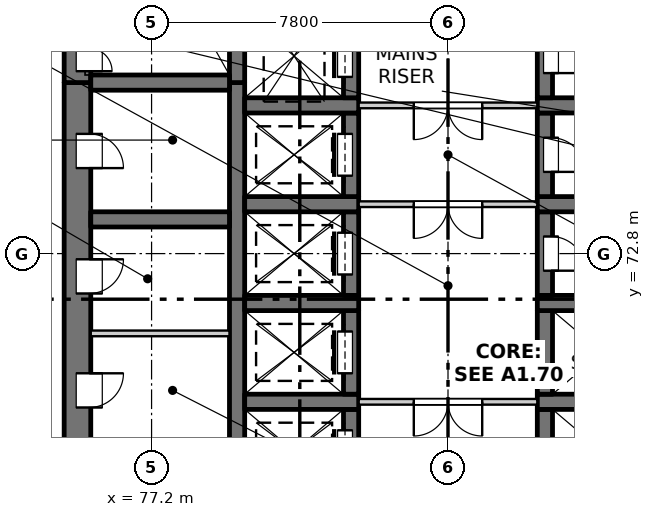
"""IFC4 building model, lengths in metres.
Left out: names, types, materials, properties, quantities, classifications, styles, units other than length and angle.
Written with IfcOpenShell. Run it as: python <this file> out.ifc"""

import sys

from ifc_helpers import new_model, si_unit, direction, frame, frame_2d, origin, place, context, subcontext, project, spatial, rectangle, extrude, element, fill, save


model = new_model("IFC4")
c1 = context("Model", 3, precision=1e-05, world=origin(), true_north=direction((0.0, 1.0)))
c2 = subcontext(c1, "Body", "Model", "MODEL_VIEW")
j1 = project(units=[si_unit("LENGTHUNIT", "METRE"), si_unit("PLANEANGLEUNIT", "RADIAN")], contexts=[c1])
p1 = place(None, origin())
s1 = spatial("IfcSite", under=j1, at=p1, CompositionType="ELEMENT")
p2 = place(p1, origin())
s2 = spatial("IfcBuilding", under=s1, at=p2, CompositionType="ELEMENT")
p3 = place(p2, frame((0.0, 0.0, 6.0)))
s3 = spatial("IfcBuildingStorey", under=s2, at=p3, CompositionType="ELEMENT", Elevation=6.0)
p4 = place(p3, frame((75.25, 54.9, -0.3), z_axis=(0.0, 0.0, 1.0), x_axis=(0.0, 1.0, 0.0)))
e1 = element("IfcWall", 1, at=p4, inside=s3, PredefinedType="SOLIDWALL", context=c2, shape_type="SweptSolid", body=[
    extrude(rectangle(XDim=22.4, YDim=0.7, at=frame_2d((11.2, 0.0))), origin(), (0.0, 0.0, 1.0), 4.5),
])
p5 = place(p4, frame((7.55, 0.0, 0.3)))
e2 = element("IfcOpeningElement", 2, at=p5, cuts=e1, PredefinedType="OPENING", context=c2, shape_type="SweptSolid", body=[
    extrude(rectangle(XDim=0.9, YDim=2.1, at=frame_2d((0.45, 1.05))), frame((0.0, 0.36, 0.0), z_axis=(0.0, -1.0, 0.0), x_axis=(1.0, 0.0, 0.0)), (0.0, 0.0, 1.0), 0.72),
])
p6 = place(p4, frame((10.85, 0.0, 0.3)))
e3 = element("IfcOpeningElement", 3, at=p6, cuts=e1, PredefinedType="OPENING", context=c2, shape_type="SweptSolid", body=[
    extrude(rectangle(XDim=0.9, YDim=2.1, at=frame_2d((0.45, 1.05))), frame((0.0, 0.36, 0.0), z_axis=(0.0, -1.0, 0.0), x_axis=(1.0, 0.0, 0.0)), (0.0, 0.0, 1.0), 0.72),
])
p7 = place(p4, frame((13.85, 0.0, 0.3)))
e4 = element("IfcOpeningElement", 4, at=p7, cuts=e1, PredefinedType="OPENING", context=c2, shape_type="SweptSolid", body=[
    extrude(rectangle(XDim=0.9, YDim=2.1, at=frame_2d((0.45, 1.05))), frame((0.0, 0.36, 0.0), z_axis=(0.0, -1.0, 0.0), x_axis=(1.0, 0.0, 0.0)), (0.0, 0.0, 1.0), 0.72),
])
p8 = place(p4, frame((16.85, 0.0, 0.3)))
e5 = element("IfcOpeningElement", 5, at=p8, cuts=e1, PredefinedType="OPENING", context=c2, shape_type="SweptSolid", body=[
    extrude(rectangle(XDim=0.9, YDim=2.1, at=frame_2d((0.45, 1.05))), frame((0.0, 0.36, 0.0), z_axis=(0.0, -1.0, 0.0), x_axis=(1.0, 0.0, 0.0)), (0.0, 0.0, 1.0), 0.72),
])
p9 = place(p4, frame((20.15, 0.0, 0.3)))
e6 = element("IfcOpeningElement", 6, at=p9, cuts=e1, PredefinedType="OPENING", context=c2, shape_type="SweptSolid", body=[
    extrude(rectangle(XDim=0.9, YDim=2.1, at=frame_2d((0.45, 1.05))), frame((0.0, 0.36, 0.0), z_axis=(0.0, -1.0, 0.0), x_axis=(1.0, 0.0, 0.0)), (0.0, 0.0, 1.0), 0.72),
])
p10 = place(p3, frame((75.25, 77.3, -0.3), z_axis=(0.0, 0.0, 1.0), x_axis=(0.0, 1.0, 0.0)))
e7 = element("IfcWall", 7, at=p10, inside=s3, PredefinedType="SOLIDWALL", context=c2, shape_type="SweptSolid", body=[
    extrude(rectangle(XDim=7.55, YDim=0.7, at=frame_2d((3.775, 0.0))), origin(), (0.0, 0.0, 1.0), 4.5),
])
p11 = place(p10, frame((0.3, 0.0, 0.3)))
e8 = element("IfcOpeningElement", 8, at=p11, cuts=e7, PredefinedType="OPENING", context=c2, shape_type="SweptSolid", body=[
    extrude(rectangle(XDim=1.2, YDim=2.1, at=frame_2d((0.6, 1.05))), frame((0.0, 0.36, 0.0), z_axis=(0.0, -1.0, 0.0), x_axis=(1.0, 0.0, 0.0)), (0.0, 0.0, 1.0), 0.72),
])
p12 = place(p3, frame((79.45, 60.9, -0.3), z_axis=(0.0, 0.0, 1.0), x_axis=(0.0, 1.0, 0.0)))
e9 = element("IfcWall", 9, at=p12, inside=s3, PredefinedType="SOLIDWALL", context=c2, shape_type="SweptSolid", body=[
    extrude(rectangle(XDim=16.4, YDim=0.4, at=frame_2d((8.2, 0.0))), origin(), (0.0, 0.0, 1.0), 4.5),
])
p13 = place(p3, frame((79.45, 77.3, -0.3), z_axis=(0.0, 0.0, 1.0), x_axis=(0.0, 1.0, 0.0)))
e10 = element("IfcWall", 10, at=p13, inside=s3, PredefinedType="SOLIDWALL", context=c2, shape_type="SweptSolid", body=[
    extrude(rectangle(XDim=6.85, YDim=0.4, at=frame_2d((3.425, 0.0))), origin(), (0.0, 0.0, 1.0), 4.5),
])
p14 = place(p3, frame((82.45, 66.5, -0.3), z_axis=(0.0, 0.0, 1.0), x_axis=(0.0, 1.0, 0.0)))
e11 = element("IfcWall", 11, at=p14, inside=s3, PredefinedType="SOLIDWALL", context=c2, shape_type="SweptSolid", body=[
    extrude(rectangle(XDim=2.2, YDim=0.4, at=frame_2d((1.1, 0.0))), origin(), (0.0, 0.0, 1.0), 4.5),
])
p15 = place(p14, frame((0.55, 0.0, 0.3)))
e12 = element("IfcOpeningElement", 12, at=p15, cuts=e11, PredefinedType="OPENING", context=c2, shape_type="SweptSolid", body=[
    extrude(rectangle(XDim=1.1, YDim=2.1, at=frame_2d((0.55, 1.05))), frame((0.0, 0.21, 0.0), z_axis=(0.0, -1.0, 0.0), x_axis=(1.0, 0.0, 0.0)), (0.0, 0.0, 1.0), 0.42),
])
p16 = place(p3, frame((79.65, 68.9, -0.3), z_axis=(0.0, 0.0, 1.0), x_axis=(1.0, 0.0, 0.0)))
e13 = element("IfcWall", 13, at=p16, inside=s3, PredefinedType="SOLIDWALL", context=c2, shape_type="SweptSolid", body=[
    extrude(rectangle(XDim=3.0, YDim=0.4, at=frame_2d((1.5, 0.0))), origin(), (0.0, 0.0, 1.0), 4.5),
])
p17 = place(p3, frame((82.45, 69.1, -0.3), z_axis=(0.0, 0.0, 1.0), x_axis=(0.0, 1.0, 0.0)))
e14 = element("IfcWall", 14, at=p17, inside=s3, PredefinedType="SOLIDWALL", context=c2, shape_type="SweptSolid", body=[
    extrude(rectangle(XDim=2.2, YDim=0.4, at=frame_2d((1.1, 0.0))), origin(), (0.0, 0.0, 1.0), 4.5),
])
p18 = place(p17, frame((0.55, 0.0, 0.3)))
e15 = element("IfcOpeningElement", 15, at=p18, cuts=e14, PredefinedType="OPENING", context=c2, shape_type="SweptSolid", body=[
    extrude(rectangle(XDim=1.1, YDim=2.1, at=frame_2d((0.55, 1.05))), frame((0.0, 0.21, 0.0), z_axis=(0.0, -1.0, 0.0), x_axis=(1.0, 0.0, 0.0)), (0.0, 0.0, 1.0), 0.42),
])
p19 = place(p3, frame((79.65, 71.5, -0.3), z_axis=(0.0, 0.0, 1.0), x_axis=(1.0, 0.0, 0.0)))
e16 = element("IfcWall", 16, at=p19, inside=s3, PredefinedType="SOLIDWALL", context=c2, shape_type="SweptSolid", body=[
    extrude(rectangle(XDim=3.0, YDim=0.4, at=frame_2d((1.5, 0.0))), origin(), (0.0, 0.0, 1.0), 4.5),
])
p20 = place(p3, frame((82.45, 71.7, -0.3), z_axis=(0.0, 0.0, 1.0), x_axis=(0.0, 1.0, 0.0)))
e17 = element("IfcWall", 17, at=p20, inside=s3, PredefinedType="SOLIDWALL", context=c2, shape_type="SweptSolid", body=[
    extrude(rectangle(XDim=2.2, YDim=0.4, at=frame_2d((1.1, 0.0))), origin(), (0.0, 0.0, 1.0), 4.5),
])
p21 = place(p20, frame((0.55, 0.0, 0.3)))
e18 = element("IfcOpeningElement", 18, at=p21, cuts=e17, PredefinedType="OPENING", context=c2, shape_type="SweptSolid", body=[
    extrude(rectangle(XDim=1.1, YDim=2.1, at=frame_2d((0.55, 1.05))), frame((0.0, 0.21, 0.0), z_axis=(0.0, -1.0, 0.0), x_axis=(1.0, 0.0, 0.0)), (0.0, 0.0, 1.0), 0.42),
])
p22 = place(p3, frame((79.65, 74.1, -0.3), z_axis=(0.0, 0.0, 1.0), x_axis=(1.0, 0.0, 0.0)))
e19 = element("IfcWall", 19, at=p22, inside=s3, PredefinedType="SOLIDWALL", context=c2, shape_type="SweptSolid", body=[
    extrude(rectangle(XDim=3.0, YDim=0.4, at=frame_2d((1.5, 0.0))), origin(), (0.0, 0.0, 1.0), 4.5),
])
p23 = place(p3, frame((82.45, 74.3, -0.3), z_axis=(0.0, 0.0, 1.0), x_axis=(0.0, 1.0, 0.0)))
e20 = element("IfcWall", 20, at=p23, inside=s3, PredefinedType="SOLIDWALL", context=c2, shape_type="SweptSolid", body=[
    extrude(rectangle(XDim=2.2, YDim=0.4, at=frame_2d((1.1, 0.0))), origin(), (0.0, 0.0, 1.0), 4.5),
])
p24 = place(p23, frame((0.55, 0.0, 0.3)))
e21 = element("IfcOpeningElement", 21, at=p24, cuts=e20, PredefinedType="OPENING", context=c2, shape_type="SweptSolid", body=[
    extrude(rectangle(XDim=1.1, YDim=2.1, at=frame_2d((0.55, 1.05))), frame((0.0, 0.21, 0.0), z_axis=(0.0, -1.0, 0.0), x_axis=(1.0, 0.0, 0.0)), (0.0, 0.0, 1.0), 0.42),
])
p25 = place(p3, frame((79.65, 76.7, -0.3), z_axis=(0.0, 0.0, 1.0), x_axis=(1.0, 0.0, 0.0)))
e22 = element("IfcWall", 22, at=p25, inside=s3, PredefinedType="SOLIDWALL", context=c2, shape_type="SweptSolid", body=[
    extrude(rectangle(XDim=3.0, YDim=0.4, at=frame_2d((1.5, 0.0))), origin(), (0.0, 0.0, 1.0), 4.5),
])
p26 = place(p3, frame((82.45, 76.9, -0.3), z_axis=(0.0, 0.0, 1.0), x_axis=(0.0, 1.0, 0.0)))
e23 = element("IfcWall", 23, at=p26, inside=s3, PredefinedType="SOLIDWALL", context=c2, shape_type="SweptSolid", body=[
    extrude(rectangle(XDim=2.2, YDim=0.4, at=frame_2d((1.1, 0.0))), origin(), (0.0, 0.0, 1.0), 4.5),
])
p27 = place(p26, frame((0.55, 0.0, 0.3)))
e24 = element("IfcOpeningElement", 24, at=p27, cuts=e23, PredefinedType="OPENING", context=c2, shape_type="SweptSolid", body=[
    extrude(rectangle(XDim=1.1, YDim=2.1, at=frame_2d((0.55, 1.05))), frame((0.0, 0.21, 0.0), z_axis=(0.0, -1.0, 0.0), x_axis=(1.0, 0.0, 0.0)), (0.0, 0.0, 1.0), 0.42),
])
p28 = place(p3, frame((87.55, 66.5, -0.3), z_axis=(0.0, 0.0, 1.0), x_axis=(0.0, 1.0, 0.0)))
e25 = element("IfcWall", 25, at=p28, inside=s3, PredefinedType="SOLIDWALL", context=c2, shape_type="SweptSolid", body=[
    extrude(rectangle(XDim=2.2, YDim=0.4, at=frame_2d((1.1, 0.0))), origin(), (0.0, 0.0, 1.0), 4.5),
])
p29 = place(p3, frame((87.35, 68.9, -0.3), z_axis=(0.0, 0.0, 1.0), x_axis=(1.0, 0.0, 0.0)))
e26 = element("IfcWall", 26, at=p29, inside=s3, PredefinedType="SOLIDWALL", context=c2, shape_type="SweptSolid", body=[
    extrude(rectangle(XDim=3.0, YDim=0.4, at=frame_2d((1.5, 0.0))), origin(), (0.0, 0.0, 1.0), 4.5),
])
p30 = place(p3, frame((87.55, 69.1, -0.3), z_axis=(0.0, 0.0, 1.0), x_axis=(0.0, 1.0, 0.0)))
e27 = element("IfcWall", 27, at=p30, inside=s3, PredefinedType="SOLIDWALL", context=c2, shape_type="SweptSolid", body=[
    extrude(rectangle(XDim=2.2, YDim=0.4, at=frame_2d((1.1, 0.0))), origin(), (0.0, 0.0, 1.0), 4.5),
])
p31 = place(p3, frame((87.35, 71.5, -0.3), z_axis=(0.0, 0.0, 1.0), x_axis=(1.0, 0.0, 0.0)))
e28 = element("IfcWall", 28, at=p31, inside=s3, PredefinedType="SOLIDWALL", context=c2, shape_type="SweptSolid", body=[
    extrude(rectangle(XDim=3.0, YDim=0.4, at=frame_2d((1.5, 0.0))), origin(), (0.0, 0.0, 1.0), 4.5),
])
p32 = place(p3, frame((87.55, 71.7, -0.3), z_axis=(0.0, 0.0, 1.0), x_axis=(0.0, 1.0, 0.0)))
e29 = element("IfcWall", 29, at=p32, inside=s3, PredefinedType="SOLIDWALL", context=c2, shape_type="SweptSolid", body=[
    extrude(rectangle(XDim=2.2, YDim=0.4, at=frame_2d((1.1, 0.0))), origin(), (0.0, 0.0, 1.0), 4.5),
])
p33 = place(p32, frame((0.65, 0.0, 0.3)))
e30 = element("IfcOpeningElement", 30, at=p33, cuts=e29, PredefinedType="OPENING", context=c2, shape_type="SweptSolid", body=[
    extrude(rectangle(XDim=0.9, YDim=2.1, at=frame_2d((0.45, 1.05))), frame((0.0, 0.21, 0.0), z_axis=(0.0, -1.0, 0.0), x_axis=(1.0, 0.0, 0.0)), (0.0, 0.0, 1.0), 0.42),
])
p34 = place(p3, frame((87.35, 74.1, -0.3), z_axis=(0.0, 0.0, 1.0), x_axis=(1.0, 0.0, 0.0)))
e31 = element("IfcWall", 31, at=p34, inside=s3, PredefinedType="SOLIDWALL", context=c2, shape_type="SweptSolid", body=[
    extrude(rectangle(XDim=3.0, YDim=0.4, at=frame_2d((1.5, 0.0))), origin(), (0.0, 0.0, 1.0), 4.5),
])
p35 = place(p3, frame((87.55, 74.3, -0.3), z_axis=(0.0, 0.0, 1.0), x_axis=(0.0, 1.0, 0.0)))
e32 = element("IfcWall", 32, at=p35, inside=s3, PredefinedType="SOLIDWALL", context=c2, shape_type="SweptSolid", body=[
    extrude(rectangle(XDim=2.2, YDim=0.4, at=frame_2d((1.1, 0.0))), origin(), (0.0, 0.0, 1.0), 4.5),
])
p36 = place(p35, frame((0.65, 0.0, 0.3)))
e33 = element("IfcOpeningElement", 33, at=p36, cuts=e32, PredefinedType="OPENING", context=c2, shape_type="SweptSolid", body=[
    extrude(rectangle(XDim=0.9, YDim=2.1, at=frame_2d((0.45, 1.05))), frame((0.0, 0.21, 0.0), z_axis=(0.0, -1.0, 0.0), x_axis=(1.0, 0.0, 0.0)), (0.0, 0.0, 1.0), 0.42),
])
p37 = place(p3, frame((87.35, 76.7, -0.3), z_axis=(0.0, 0.0, 1.0), x_axis=(1.0, 0.0, 0.0)))
e34 = element("IfcWall", 34, at=p37, inside=s3, PredefinedType="SOLIDWALL", context=c2, shape_type="SweptSolid", body=[
    extrude(rectangle(XDim=3.0, YDim=0.4, at=frame_2d((1.5, 0.0))), origin(), (0.0, 0.0, 1.0), 4.5),
])
p38 = place(p3, frame((87.55, 76.9, -0.3), z_axis=(0.0, 0.0, 1.0), x_axis=(0.0, 1.0, 0.0)))
e35 = element("IfcWall", 35, at=p38, inside=s3, PredefinedType="SOLIDWALL", context=c2, shape_type="SweptSolid", body=[
    extrude(rectangle(XDim=2.2, YDim=0.4, at=frame_2d((1.1, 0.0))), origin(), (0.0, 0.0, 1.0), 4.5),
])
p39 = place(p38, frame((0.65, 0.0, 0.3)))
e36 = element("IfcOpeningElement", 36, at=p39, cuts=e35, PredefinedType="OPENING", context=c2, shape_type="SweptSolid", body=[
    extrude(rectangle(XDim=0.9, YDim=2.1, at=frame_2d((0.45, 1.05))), frame((0.0, 0.21, 0.0), z_axis=(0.0, -1.0, 0.0), x_axis=(1.0, 0.0, 0.0)), (0.0, 0.0, 1.0), 0.42),
])
for number, where, z_axis, x_axis in (
    (37, (75.6, 73.7, -0.3), (0.0, 0.0, 1.0), (1.0, 0.0, 0.0)),
    (38, (75.6, 77.3, -0.3), (0.0, 0.0, 1.0), (1.0, 0.0, 0.0)),
):
    element("IfcWall", number, at=place(p3, frame(where, z_axis=z_axis, x_axis=x_axis)), inside=s3, PredefinedType="SOLIDWALL", context=c2, shape_type="SweptSolid", body=[
        extrude(rectangle(XDim=3.65, YDim=0.4, at=frame_2d((1.825, 0.0))), origin(), (0.0, 0.0, 1.0), 4.5),
    ])
p40 = place(p3, frame((82.65, 68.9, 0.0), z_axis=(0.0, 0.0, 1.0), x_axis=(1.0, 0.0, 0.0)))
e39 = element("IfcWall", 39, at=p40, inside=s3, PredefinedType="PARTITIONING", context=c2, shape_type="SweptSolid", body=[
    extrude(rectangle(XDim=4.7, YDim=0.15, at=frame_2d((2.35, 0.0))), origin(), (0.0, 0.0, 1.0), 4.2),
])
p41 = place(p40, frame((1.45, 0.0, 0.0)))
e40 = element("IfcOpeningElement", 40, at=p41, cuts=e39, PredefinedType="OPENING", context=c2, shape_type="SweptSolid", body=[
    extrude(rectangle(XDim=1.8, YDim=2.1, at=frame_2d((0.9, 1.05))), frame((0.0, 0.085, 0.0), z_axis=(0.0, -1.0, 0.0), x_axis=(1.0, 0.0, 0.0)), (0.0, 0.0, 1.0), 0.17),
])
p42 = place(p3, frame((75.6, 70.7, 0.0), z_axis=(0.0, 0.0, 1.0), x_axis=(1.0, 0.0, 0.0)))
e41 = element("IfcWall", 41, at=p42, inside=s3, PredefinedType="PARTITIONING", context=c2, shape_type="SweptSolid", body=[
    extrude(rectangle(XDim=3.65, YDim=0.15, at=frame_2d((1.825, 0.0))), origin(), (0.0, 0.0, 1.0), 4.2),
])
p43 = place(p3, frame((82.65, 74.1, 0.0), z_axis=(0.0, 0.0, 1.0), x_axis=(1.0, 0.0, 0.0)))
e42 = element("IfcWall", 42, at=p43, inside=s3, PredefinedType="PARTITIONING", context=c2, shape_type="SweptSolid", body=[
    extrude(rectangle(XDim=4.7, YDim=0.15, at=frame_2d((2.35, 0.0))), origin(), (0.0, 0.0, 1.0), 4.2),
])
p44 = place(p43, frame((1.45, 0.0, 0.0)))
e43 = element("IfcOpeningElement", 43, at=p44, cuts=e42, PredefinedType="OPENING", context=c2, shape_type="SweptSolid", body=[
    extrude(rectangle(XDim=1.8, YDim=2.1, at=frame_2d((0.9, 1.05))), frame((0.0, 0.085, 0.0), z_axis=(0.0, -1.0, 0.0), x_axis=(1.0, 0.0, 0.0)), (0.0, 0.0, 1.0), 0.17),
])
p45 = place(p3, frame((82.65, 76.7, 0.0), z_axis=(0.0, 0.0, 1.0), x_axis=(1.0, 0.0, 0.0)))
e44 = element("IfcWall", 44, at=p45, inside=s3, PredefinedType="PARTITIONING", context=c2, shape_type="SweptSolid", body=[
    extrude(rectangle(XDim=4.7, YDim=0.15, at=frame_2d((2.35, 0.0))), origin(), (0.0, 0.0, 1.0), 4.2),
])
p46 = place(p45, frame((1.45, 0.0, 0.0)))
e45 = element("IfcOpeningElement", 45, at=p46, cuts=e44, PredefinedType="OPENING", context=c2, shape_type="SweptSolid", body=[
    extrude(rectangle(XDim=1.8, YDim=2.1, at=frame_2d((0.9, 1.05))), frame((0.0, 0.085, 0.0), z_axis=(0.0, -1.0, 0.0), x_axis=(1.0, 0.0, 0.0)), (0.0, 0.0, 1.0), 0.17),
])
p47 = place(p15, origin())
e46 = element("IfcDoor", 46, at=p47, inside=s3, OperationType="SLIDING_TO_RIGHT", PredefinedType="DOOR", context=c2, shape_type="SweptSolid", body=[
    extrude(rectangle(XDim=1.1, YDim=2.1, at=frame_2d((0.55, 1.05))), frame((0.0, 0.185, 0.0), z_axis=(0.0, -1.0, 0.0), x_axis=(1.0, 0.0, 0.0)), (0.0, 0.0, 1.0), 0.05),
])
fill(e12, e46)
p48 = place(p41, origin())
e47 = element("IfcDoor", 47, at=p48, inside=s3, OperationType="DOUBLE_DOOR_SINGLE_SWING", PredefinedType="DOOR", context=c2, shape_type="SweptSolid", body=[
    extrude(rectangle(XDim=1.8, YDim=2.1, at=frame_2d((0.9, 1.05))), frame((0.0, 0.025, 0.0), z_axis=(0.0, -1.0, 0.0), x_axis=(1.0, 0.0, 0.0)), (0.0, 0.0, 1.0), 0.05),
])
fill(e40, e47)
p49 = place(p7, origin())
e48 = element("IfcDoor", 48, at=p49, inside=s3, OperationType="SINGLE_SWING_LEFT", PredefinedType="DOOR", context=c2, shape_type="SweptSolid", body=[
    extrude(rectangle(XDim=0.9, YDim=2.1, at=frame_2d((0.45, 1.05))), frame((0.0, -0.285, 0.0), z_axis=(0.0, -1.0, 0.0), x_axis=(1.0, 0.0, 0.0)), (0.0, 0.0, 1.0), 0.05),
])
fill(e4, e48)
p50 = place(p18, origin())
e49 = element("IfcDoor", 49, at=p50, inside=s3, OperationType="SLIDING_TO_LEFT", PredefinedType="DOOR", context=c2, shape_type="SweptSolid", body=[
    extrude(rectangle(XDim=1.1, YDim=2.1, at=frame_2d((0.55, 1.05))), frame((0.0, 0.185, 0.0), z_axis=(0.0, -1.0, 0.0), x_axis=(1.0, 0.0, 0.0)), (0.0, 0.0, 1.0), 0.05),
])
fill(e15, e49)
p51 = place(p8, origin())
e50 = element("IfcDoor", 50, at=p51, inside=s3, OperationType="SINGLE_SWING_LEFT", PredefinedType="DOOR", context=c2, shape_type="SweptSolid", body=[
    extrude(rectangle(XDim=0.9, YDim=2.1, at=frame_2d((0.45, 1.05))), frame((0.0, -0.285, 0.0), z_axis=(0.0, -1.0, 0.0), x_axis=(1.0, 0.0, 0.0)), (0.0, 0.0, 1.0), 0.05),
])
fill(e5, e50)
p52 = place(p21, origin())
e51 = element("IfcDoor", 51, at=p52, inside=s3, OperationType="SLIDING_TO_LEFT", PredefinedType="DOOR", context=c2, shape_type="SweptSolid", body=[
    extrude(rectangle(XDim=1.1, YDim=2.1, at=frame_2d((0.55, 1.05))), frame((0.0, 0.185, 0.0), z_axis=(0.0, -1.0, 0.0), x_axis=(1.0, 0.0, 0.0)), (0.0, 0.0, 1.0), 0.05),
])
fill(e18, e51)
p53 = place(p33, origin())
e52 = element("IfcDoor", 52, at=p53, inside=s3, OperationType="SINGLE_SWING_RIGHT", PredefinedType="DOOR", context=c2, shape_type="SweptSolid", body=[
    extrude(rectangle(XDim=0.9, YDim=2.1, at=frame_2d((0.45, 1.05))), frame((0.0, -0.135, 0.0), z_axis=(0.0, -1.0, 0.0), x_axis=(1.0, 0.0, 0.0)), (0.0, 0.0, 1.0), 0.05),
])
fill(e30, e52)
p54 = place(p44, origin())
e53 = element("IfcDoor", 53, at=p54, inside=s3, OperationType="DOUBLE_DOOR_SINGLE_SWING", PredefinedType="DOOR", context=c2, shape_type="SweptSolid", body=[
    extrude(rectangle(XDim=1.8, YDim=2.1, at=frame_2d((0.9, 1.05))), frame((0.0, 0.025, 0.0), z_axis=(0.0, -1.0, 0.0), x_axis=(1.0, 0.0, 0.0)), (0.0, 0.0, 1.0), 0.05),
])
fill(e43, e53)
p55 = place(p24, origin())
e54 = element("IfcDoor", 54, at=p55, inside=s3, OperationType="SLIDING_TO_LEFT", PredefinedType="DOOR", context=c2, shape_type="SweptSolid", body=[
    extrude(rectangle(XDim=1.1, YDim=2.1, at=frame_2d((0.55, 1.05))), frame((0.0, 0.185, 0.0), z_axis=(0.0, -1.0, 0.0), x_axis=(1.0, 0.0, 0.0)), (0.0, 0.0, 1.0), 0.05),
])
fill(e21, e54)
p56 = place(p36, origin())
e55 = element("IfcDoor", 55, at=p56, inside=s3, OperationType="SINGLE_SWING_RIGHT", PredefinedType="DOOR", context=c2, shape_type="SweptSolid", body=[
    extrude(rectangle(XDim=0.9, YDim=2.1, at=frame_2d((0.45, 1.05))), frame((0.0, -0.135, 0.0), z_axis=(0.0, -1.0, 0.0), x_axis=(1.0, 0.0, 0.0)), (0.0, 0.0, 1.0), 0.05),
])
fill(e33, e55)
p57 = place(p9, origin())
e56 = element("IfcDoor", 56, at=p57, inside=s3, OperationType="SINGLE_SWING_RIGHT", PredefinedType="DOOR", context=c2, shape_type="SweptSolid", body=[
    extrude(rectangle(XDim=0.9, YDim=2.1, at=frame_2d((0.45, 1.05))), frame((0.0, -0.285, 0.0), z_axis=(0.0, -1.0, 0.0), x_axis=(1.0, 0.0, 0.0)), (0.0, 0.0, 1.0), 0.05),
])
fill(e6, e56)
p58 = place(p46, origin())
e57 = element("IfcDoor", 57, at=p58, inside=s3, OperationType="DOUBLE_DOOR_SINGLE_SWING", PredefinedType="DOOR", context=c2, shape_type="SweptSolid", body=[
    extrude(rectangle(XDim=1.8, YDim=2.1, at=frame_2d((0.9, 1.05))), frame((0.0, 0.025, 0.0), z_axis=(0.0, -1.0, 0.0), x_axis=(1.0, 0.0, 0.0)), (0.0, 0.0, 1.0), 0.05),
])
fill(e45, e57)
p59 = place(p27, origin())
e58 = element("IfcDoor", 58, at=p59, inside=s3, OperationType="SLIDING_TO_LEFT", PredefinedType="DOOR", context=c2, shape_type="SweptSolid", body=[
    extrude(rectangle(XDim=1.1, YDim=2.1, at=frame_2d((0.55, 1.05))), frame((0.0, 0.185, 0.0), z_axis=(0.0, -1.0, 0.0), x_axis=(1.0, 0.0, 0.0)), (0.0, 0.0, 1.0), 0.05),
])
fill(e24, e58)
p60 = place(p39, origin())
e59 = element("IfcDoor", 59, at=p60, inside=s3, OperationType="SINGLE_SWING_RIGHT", PredefinedType="DOOR", context=c2, shape_type="SweptSolid", body=[
    extrude(rectangle(XDim=0.9, YDim=2.1, at=frame_2d((0.45, 1.05))), frame((0.0, -0.135, 0.0), z_axis=(0.0, -1.0, 0.0), x_axis=(1.0, 0.0, 0.0)), (0.0, 0.0, 1.0), 0.05),
])
fill(e36, e59)
p61 = place(p11, origin())
e60 = element("IfcDoor", 60, at=p61, inside=s3, OperationType="DOUBLE_DOOR_SINGLE_SWING", PredefinedType="DOOR", context=c2, shape_type="SweptSolid", body=[
    extrude(rectangle(XDim=1.2, YDim=2.1, at=frame_2d((0.6, 1.05))), frame((0.0, -0.285, 0.0), z_axis=(0.0, -1.0, 0.0), x_axis=(1.0, 0.0, 0.0)), (0.0, 0.0, 1.0), 0.05),
])
fill(e8, e60)
save(model, sys.argv[1])
